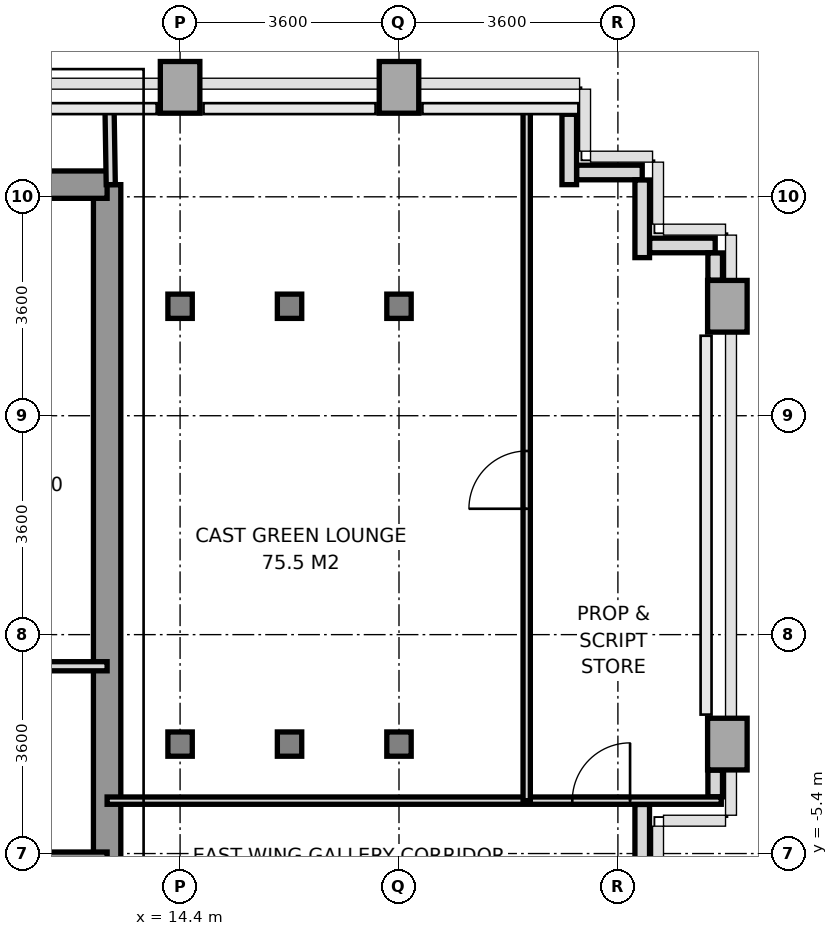
"""IFC4 building model, lengths in metres.
Left out: names, types, materials, properties, quantities, classifications, styles, units other than length and angle.
Written with IfcOpenShell. Run it as: python <this file> out.ifc"""

import sys

from ifc_helpers import new_model, si_unit, direction, frame, frame_2d, origin, origin_2d, place, context, subcontext, project, spatial, rectangle, i_section, extrude, source, transform, mapped, element, fill, save


model = new_model("IFC4")
c1 = context("Model", 3, precision=1e-05, world=origin(), true_north=direction((0.0, 1.0)))
c2 = subcontext(c1, "Body", "Model", "MODEL_VIEW")
j1 = project(units=[si_unit("LENGTHUNIT", "METRE"), si_unit("PLANEANGLEUNIT", "RADIAN")], contexts=[c1])
p1 = place(None, origin())
s1 = spatial("IfcSite", under=j1, at=p1, CompositionType="ELEMENT")
p2 = place(p1, origin())
s2 = spatial("IfcBuilding", under=s1, at=p2, CompositionType="ELEMENT")
p3 = place(p2, frame((0.0, 0.0, 110.8)))
s3 = spatial("IfcBuildingStorey", under=s2, at=p3, CompositionType="ELEMENT", Elevation=110.8)
m1 = source(origin(), c2, "Body", "SweptSolid", [
    extrude(i_section(OverallWidth=0.401, OverallDepth=0.399, WebThickness=0.02, FlangeThickness=0.032, at=origin_2d()), origin(), (0.0, 0.0, 1.0), 3.2),
])
for number, where, z_axis, x_axis in (
    (1, (14.4, -3.6, 0.0), (0.0, 0.0, 1.0), (1.0, 0.0, 0.0)),
    (2, (14.4, 3.6, 0.0), (0.0, 0.0, 1.0), (1.0, 0.0, 0.0)),
):
    element("IfcColumn", number, at=place(p3, frame(where, z_axis=z_axis, x_axis=x_axis)), inside=s3, PredefinedType="COLUMN", context=c2, shape_type="MappedRepresentation", body=[
        mapped(m1, transform((0.0, 0.0, 0.0), x_axis=(1.0, 0.0, 0.0), y_axis=(0.0, 1.0, 0.0), z_axis=(0.0, 0.0, 1.0), scale=1.0)),
    ])
m2 = source(origin(), c2, "Body", "SweptSolid", [
    extrude(rectangle(XDim=0.65, YDim=0.85, at=origin_2d()), origin(), (0.0, 0.0, 1.0), 3.2),
])
p4 = place(p3, frame((14.4, 7.2, 0.0), z_axis=(0.0, 0.0, 1.0), x_axis=(1.0, 0.0, 0.0)))
e3 = element("IfcColumn", 3, at=p4, inside=s3, PredefinedType="COLUMN", context=c2, shape_type="MappedRepresentation", body=[
    mapped(m2, transform((0.0, 0.0, 0.0), x_axis=(1.0, 0.0, 0.0), y_axis=(0.0, 1.0, 0.0), z_axis=(0.0, 0.0, 1.0), scale=1.0)),
])
for number, where, z_axis, x_axis in (
    (4, (16.2, -3.6, 0.0), (0.0, 0.0, 1.0), (1.0, 0.0, 0.0)),
    (5, (16.2, 3.6, 0.0), (0.0, 0.0, 1.0), (1.0, 0.0, 0.0)),
    (6, (18.0, -3.6, 0.0), (0.0, 0.0, 1.0), (1.0, 0.0, 0.0)),
    (7, (18.0, 3.6, 0.0), (0.0, 0.0, 1.0), (1.0, 0.0, 0.0)),
):
    element("IfcColumn", number, at=place(p3, frame(where, z_axis=z_axis, x_axis=x_axis)), inside=s3, PredefinedType="COLUMN", context=c2, shape_type="MappedRepresentation", body=[
        mapped(m1, transform((0.0, 0.0, 0.0), x_axis=(1.0, 0.0, 0.0), y_axis=(0.0, 1.0, 0.0), z_axis=(0.0, 0.0, 1.0), scale=1.0)),
    ])
for number, where, z_axis, x_axis in (
    (8, (18.0, 7.2, 0.0), (0.0, 0.0, 1.0), (1.0, 0.0, 0.0)),
    (9, (23.4, -3.6, 0.0), (0.0, 0.0, 1.0), (1.0, 0.0, 0.0)),
    (10, (23.4, 3.6, 0.0), (0.0, 0.0, 1.0), (1.0, 0.0, 0.0)),
):
    element("IfcColumn", number, at=place(p3, frame(where, z_axis=z_axis, x_axis=x_axis)), inside=s3, PredefinedType="COLUMN", context=c2, shape_type="MappedRepresentation", body=[
        mapped(m2, transform((0.0, 0.0, 0.0), x_axis=(1.0, 0.0, 0.0), y_axis=(0.0, 1.0, 0.0), z_axis=(0.0, 0.0, 1.0), scale=1.0)),
    ])
p5 = place(p3, frame((22.0, -4.593, 0.0), z_axis=(0.0, 0.0, 1.0), x_axis=(0.0, -1.0, 0.0)))
e11 = element("IfcWall", 11, at=p5, inside=s3, PredefinedType="PARAPET", context=c2, shape_type="SweptSolid", body=[
    extrude(rectangle(XDim=1.207, YDim=0.24, at=frame_2d((0.604, 0.0))), origin(), (0.0, 0.0, 1.0), 1.15),
])
p6 = place(p3, frame((20.8, 6.757, 0.0), z_axis=(0.0, 0.0, 1.0), x_axis=(0.0, -1.0, 0.0)))
e12 = element("IfcWall", 12, at=p6, inside=s3, PredefinedType="PARAPET", context=c2, shape_type="SweptSolid", body=[
    extrude(rectangle(XDim=1.157, YDim=0.24, at=frame_2d((0.579, 0.0))), origin(), (0.0, 0.0, 1.0), 1.15),
])
p7 = place(p3, frame((20.923, 5.8, 0.0), z_axis=(0.0, 0.0, 1.0), x_axis=(1.0, 0.0, 0.0)))
e13 = element("IfcWall", 13, at=p7, inside=s3, PredefinedType="PARAPET", context=c2, shape_type="SweptSolid", body=[
    extrude(rectangle(XDim=1.077, YDim=0.24, at=frame_2d((0.539, 0.0))), origin(), (0.0, 0.0, 1.0), 1.15),
])
p8 = place(p3, frame((22.0, 5.677, 0.0), z_axis=(0.0, 0.0, 1.0), x_axis=(0.0, -1.0, 0.0)))
e14 = element("IfcWall", 14, at=p8, inside=s3, PredefinedType="PARAPET", context=c2, shape_type="SweptSolid", body=[
    extrude(rectangle(XDim=1.277, YDim=0.24, at=frame_2d((0.639, 0.0))), origin(), (0.0, 0.0, 1.0), 1.15),
])
p9 = place(p3, frame((22.123, 4.6, 0.0), z_axis=(0.0, 0.0, 1.0), x_axis=(1.0, 0.0, 0.0)))
e15 = element("IfcWall", 15, at=p9, inside=s3, PredefinedType="PARAPET", context=c2, shape_type="SweptSolid", body=[
    extrude(rectangle(XDim=1.077, YDim=0.24, at=frame_2d((0.539, 0.0))), origin(), (0.0, 0.0, 1.0), 1.15),
])
p10 = place(p3, frame((23.2, 4.477, 0.0), z_axis=(0.0, 0.0, 1.0), x_axis=(0.0, -1.0, 0.0)))
e16 = element("IfcWall", 16, at=p10, inside=s3, PredefinedType="PARAPET", context=c2, shape_type="SweptSolid", body=[
    extrude(rectangle(XDim=0.449, YDim=0.24, at=frame_2d((0.225, 0.0))), origin(), (0.0, 0.0, 1.0), 1.15),
])
p11 = place(p3, frame((23.2, -4.028, 0.0), z_axis=(0.0, 0.0, 1.0), x_axis=(0.0, -1.0, 0.0)))
e17 = element("IfcWall", 17, at=p11, inside=s3, PredefinedType="PARAPET", context=c2, shape_type="SweptSolid", body=[
    extrude(rectangle(XDim=0.439, YDim=0.24, at=frame_2d((0.219, 0.0))), origin(), (0.0, 0.0, 1.0), 1.15),
])
p12 = place(p3, frame((13.2, -5.6, 0.0), z_axis=(0.0, 0.0, 1.0), x_axis=(0.0, 1.0, 0.0)))
e18 = element("IfcWall", 18, at=p12, inside=s3, PredefinedType="SHEAR", context=c2, shape_type="SweptSolid", body=[
    extrude(rectangle(XDim=11.2, YDim=0.45, at=frame_2d((5.6, 0.0))), origin(), (0.0, 0.0, 1.0), 3.2),
])
p13 = place(p3, frame((11.381, 5.6, 0.0), z_axis=(0.0, 0.0, 1.0), x_axis=(1.0, 0.0, 0.0)))
e19 = element("IfcWall", 19, at=p13, inside=s3, PredefinedType="SHEAR", context=c2, shape_type="SweptSolid", body=[
    extrude(rectangle(XDim=1.819, YDim=0.45, at=frame_2d((0.909, 0.0))), origin(), (0.0, 0.0, 1.0), 3.2),
])
p14 = place(p3, frame((5.4, -5.6, 0.0), z_axis=(0.0, 0.0, 1.0), x_axis=(1.0, 0.0, 0.0)))
e20 = element("IfcWall", 20, at=p14, inside=s3, PredefinedType="SHEAR", context=c2, shape_type="SweptSolid", body=[
    extrude(rectangle(XDim=7.8, YDim=0.45, at=frame_2d((3.9, 0.0))), origin(), (0.0, 0.0, 1.0), 3.2),
])
p15 = place(p14, frame((3.0, 0.0, 0.0)))
e21 = element("IfcOpeningElement", 21, at=p15, cuts=e20, PredefinedType="OPENING", context=c2, shape_type="SweptSolid", body=[
    extrude(rectangle(XDim=1.2, YDim=2.2, at=frame_2d((0.6, 1.1))), frame((0.0, 0.235, 0.0), z_axis=(0.0, -1.0, 0.0), x_axis=(1.0, 0.0, 0.0)), (0.0, 0.0, 1.0), 0.47),
])
p16 = place(p14, frame((5.85, 0.0, 0.0)))
e22 = element("IfcOpeningElement", 22, at=p16, cuts=e20, PredefinedType="OPENING", context=c2, shape_type="SweptSolid", body=[
    extrude(rectangle(XDim=0.8, YDim=2.1, at=frame_2d((0.4, 1.05))), frame((0.0, 0.235, 0.0), z_axis=(0.0, -1.0, 0.0), x_axis=(1.0, 0.0, 0.0)), (0.0, 0.0, 1.0), 0.47),
])
p17 = place(p3, frame((11.02, -2.32, 0.0), z_axis=(0.0, 0.0, 1.0), x_axis=(1.0, 0.0, 0.0)))
e23 = element("IfcWall", 23, at=p17, inside=s3, PredefinedType="PARTITIONING", context=c2, shape_type="SweptSolid", body=[
    extrude(rectangle(XDim=2.18, YDim=0.15, at=frame_2d((1.09, 0.0))), origin(), (0.0, 0.0, 1.0), 3.2),
])
p18 = place(p3, frame((13.26, 5.6, 0.0), z_axis=(0.0, 0.0, 1.0), x_axis=(-0.016013571389, 0.999871774545, 0.0)))
e24 = element("IfcWall", 24, at=p18, inside=s3, PredefinedType="PARTITIONING", context=c2, shape_type="SweptSolid", body=[
    extrude(rectangle(XDim=1.25, YDim=0.15, at=frame_2d((0.625, 0.0))), origin(), (0.0, 0.0, 1.0), 3.2),
])
p19 = place(p3, frame((13.2, -4.53, 0.0), z_axis=(0.0, 0.0, 1.0), x_axis=(1.0, 0.0, 0.0)))
e25 = element("IfcWall", 25, at=p19, inside=s3, PredefinedType="PARTITIONING", context=c2, shape_type="SweptSolid", body=[
    extrude(rectangle(XDim=10.1, YDim=0.12, at=frame_2d((5.05, 0.0))), origin(), (0.0, 0.0, 1.0), 2.76),
])
p20 = place(p19, frame((7.65, 0.0, 0.0)))
e26 = element("IfcOpeningElement", 26, at=p20, cuts=e25, PredefinedType="OPENING", context=c2, shape_type="SweptSolid", body=[
    extrude(rectangle(XDim=0.95, YDim=2.15, at=frame_2d((0.475, 1.075))), frame((0.0, 0.07, 0.0), z_axis=(0.0, -1.0, 0.0), x_axis=(1.0, 0.0, 0.0)), (0.0, 0.0, 1.0), 0.14),
])
p21 = place(p3, frame((20.1, -4.53, 0.0), z_axis=(0.0, 0.0, 1.0), x_axis=(0.0, 1.0, 0.0)))
e27 = element("IfcWall", 27, at=p21, inside=s3, PredefinedType="PARTITIONING", context=c2, shape_type="SweptSolid", body=[
    extrude(rectangle(XDim=11.38, YDim=0.12, at=frame_2d((5.69, 0.0))), origin(), (0.0, 0.0, 1.0), 2.7),
])
p22 = place(p21, frame((4.8, 0.0, 0.0)))
e28 = element("IfcOpeningElement", 28, at=p22, cuts=e27, PredefinedType="OPENING", context=c2, shape_type="SweptSolid", body=[
    extrude(rectangle(XDim=0.95, YDim=2.15, at=frame_2d((0.475, 1.075))), frame((0.0, 0.07, 0.0), z_axis=(0.0, -1.0, 0.0), x_axis=(1.0, 0.0, 0.0)), (0.0, 0.0, 1.0), 0.14),
])
m3 = source(origin(), c2, "Body", "SweptSolid", [
    extrude(rectangle(XDim=0.95, YDim=2.15, at=frame_2d((0.475, 1.075))), frame((0.0, 0.025, 0.0), z_axis=(0.0, -1.0, 0.0), x_axis=(1.0, 0.0, 0.0)), (0.0, 0.0, 1.0), 0.05),
])
p23 = place(p20, origin())
e29 = element("IfcDoor", 29, at=p23, inside=s3, OperationType="SINGLE_SWING_RIGHT", PredefinedType="DOOR", context=c2, shape_type="MappedRepresentation", body=[
    mapped(m3, transform((0.0, 0.0, 0.0), x_axis=(1.0, 0.0, 0.0), y_axis=(0.0, 1.0, 0.0), z_axis=(0.0, 0.0, 1.0), scale=1.0)),
])
fill(e26, e29)
p24 = place(p22, origin())
e30 = element("IfcDoor", 30, at=p24, inside=s3, OperationType="SINGLE_SWING_LEFT", PredefinedType="DOOR", context=c2, shape_type="MappedRepresentation", body=[
    mapped(m3, transform((0.0, 0.0, 0.0), x_axis=(1.0, 0.0, 0.0), y_axis=(0.0, 1.0, 0.0), z_axis=(0.0, 0.0, 1.0), scale=1.0)),
])
fill(e28, e30)
save(model, sys.argv[1])
